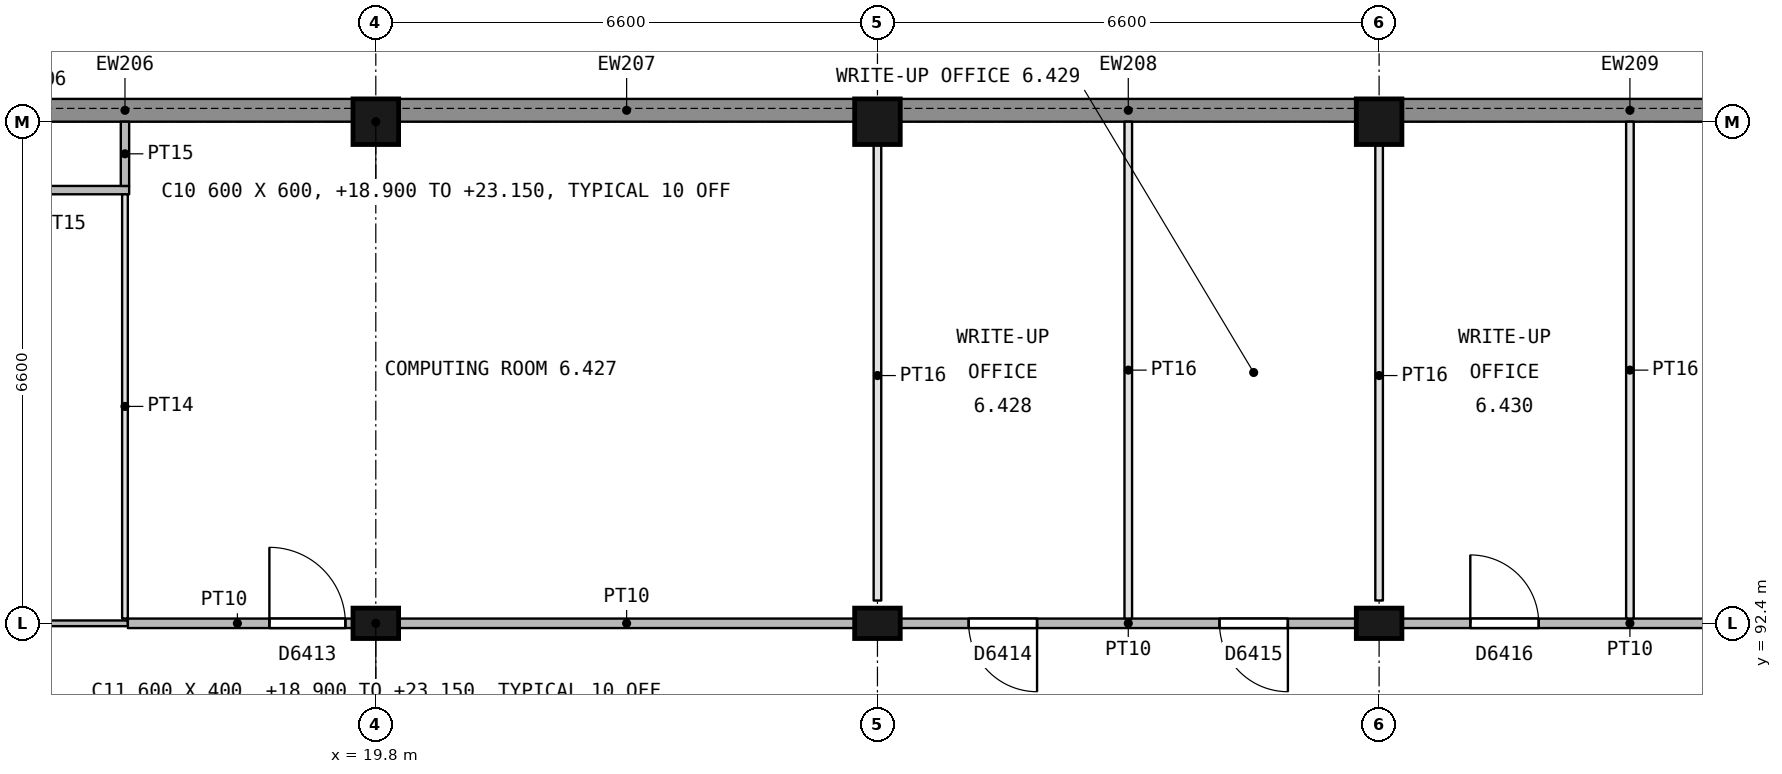
"""IFC4 building model, lengths in metres.
Left out: names, types, materials, properties, quantities, classifications, styles, units other than length and angle.
Written with IfcOpenShell. Run it as: python <this file> out.ifc"""

import sys

from ifc_helpers import new_model, si_unit, direction, frame, frame_2d, origin, origin_2d, place, context, subcontext, project, spatial, rectangle, extrude, element, fill, save


model = new_model("IFC4")
c1 = context("Model", 3, precision=1e-05, world=origin(), true_north=direction((0.0, 1.0)))
c2 = subcontext(c1, "Body", "Model", "MODEL_VIEW")
j1 = project(units=[si_unit("LENGTHUNIT", "METRE"), si_unit("PLANEANGLEUNIT", "RADIAN")], contexts=[c1])
p1 = place(None, origin())
s1 = spatial("IfcSite", under=j1, at=p1, CompositionType="ELEMENT")
p2 = place(p1, origin())
s2 = spatial("IfcBuilding", under=s1, at=p2, CompositionType="ELEMENT")
p3 = place(p2, frame((0.0, 0.0, 18.9)))
s3 = spatial("IfcBuildingStorey", under=s2, at=p3, CompositionType="ELEMENT", Elevation=18.9)
p4 = place(p3, frame((19.8, 92.4, 0.0), z_axis=(0.0, 0.0, 1.0), x_axis=(1.0, 0.0, 0.0)))
e1 = element("IfcColumn", 1, at=p4, inside=s3, PredefinedType="COLUMN", context=c2, shape_type="SweptSolid", body=[
    extrude(rectangle(XDim=0.6, YDim=0.4, at=origin_2d()), origin(), (0.0, 0.0, 1.0), 4.25),
])
p5 = place(p3, frame((19.8, 99.0, 0.0), z_axis=(0.0, 0.0, 1.0), x_axis=(1.0, 0.0, 0.0)))
e2 = element("IfcColumn", 2, at=p5, inside=s3, PredefinedType="COLUMN", context=c2, shape_type="SweptSolid", body=[
    extrude(rectangle(XDim=0.6, YDim=0.6, at=origin_2d()), origin(), (0.0, 0.0, 1.0), 4.25),
])
p6 = place(p3, frame((26.4, 92.4, 0.0), z_axis=(0.0, 0.0, 1.0), x_axis=(1.0, 0.0, 0.0)))
e3 = element("IfcColumn", 3, at=p6, inside=s3, PredefinedType="COLUMN", context=c2, shape_type="SweptSolid", body=[
    extrude(rectangle(XDim=0.6, YDim=0.4, at=origin_2d()), origin(), (0.0, 0.0, 1.0), 4.25),
])
p7 = place(p3, frame((26.4, 99.0, 0.0), z_axis=(0.0, 0.0, 1.0), x_axis=(1.0, 0.0, 0.0)))
e4 = element("IfcColumn", 4, at=p7, inside=s3, PredefinedType="COLUMN", context=c2, shape_type="SweptSolid", body=[
    extrude(rectangle(XDim=0.6, YDim=0.6, at=origin_2d()), origin(), (0.0, 0.0, 1.0), 4.25),
])
p8 = place(p3, frame((33.0, 92.4, 0.0), z_axis=(0.0, 0.0, 1.0), x_axis=(1.0, 0.0, 0.0)))
e5 = element("IfcColumn", 5, at=p8, inside=s3, PredefinedType="COLUMN", context=c2, shape_type="SweptSolid", body=[
    extrude(rectangle(XDim=0.6, YDim=0.4, at=origin_2d()), origin(), (0.0, 0.0, 1.0), 4.25),
])
p9 = place(p3, frame((33.0, 99.0, 0.0), z_axis=(0.0, 0.0, 1.0), x_axis=(1.0, 0.0, 0.0)))
e6 = element("IfcColumn", 6, at=p9, inside=s3, PredefinedType="COLUMN", context=c2, shape_type="SweptSolid", body=[
    extrude(rectangle(XDim=0.6, YDim=0.6, at=origin_2d()), origin(), (0.0, 0.0, 1.0), 4.25),
])
for number, where, z_axis, x_axis in (
    (7, (13.5, 99.15, 0.0), (0.0, 0.0, 1.0), (1.0, 0.0, 0.0)),
    (8, (20.1, 99.15, 0.0), (0.0, 0.0, 1.0), (1.0, 0.0, 0.0)),
    (9, (26.7, 99.15, 0.0), (0.0, 0.0, 1.0), (1.0, 0.0, 0.0)),
    (10, (33.3, 99.15, 0.0), (0.0, 0.0, 1.0), (1.0, 0.0, 0.0)),
):
    element("IfcWall", number, at=place(p3, frame(where, z_axis=z_axis, x_axis=x_axis)), inside=s3, PredefinedType="STANDARD", context=c2, shape_type="SweptSolid", body=[
        extrude(rectangle(XDim=6.0, YDim=0.3, at=frame_2d((3.0, 0.0))), origin(), (0.0, 0.0, 1.0), 3.65),
    ])
p10 = place(p3, frame((13.5, 92.4, 0.0), z_axis=(0.0, 0.0, 1.0), x_axis=(1.0, 0.0, 0.0)))
e11 = element("IfcWall", 11, at=p10, inside=s3, PredefinedType="PARTITIONING", context=c2, shape_type="SweptSolid", body=[
    extrude(rectangle(XDim=3.038, YDim=0.075, at=frame_2d((1.519, 0.0))), origin(), (0.0, 0.0, 1.0), 3.65),
])
p11 = place(p3, frame((16.538, 92.4, 0.0), z_axis=(0.0, 0.0, 1.0), x_axis=(1.0, 0.0, 0.0)))
e12 = element("IfcWall", 12, at=p11, inside=s3, PredefinedType="PARTITIONING", context=c2, shape_type="SweptSolid", body=[
    extrude(rectangle(XDim=2.962, YDim=0.125, at=frame_2d((1.481, 0.0))), origin(), (0.0, 0.0, 1.0), 3.65),
])
p12 = place(p11, frame((1.862, 0.0, 0.0)))
e13 = element("IfcOpeningElement", 13, at=p12, cuts=e12, PredefinedType="OPENING", context=c2, shape_type="SweptSolid", body=[
    extrude(rectangle(XDim=1.0, YDim=2.1, at=frame_2d((0.5, 1.05))), frame((0.0, 0.073, 0.0), z_axis=(0.0, -1.0, 0.0), x_axis=(1.0, 0.0, 0.0)), (0.0, 0.0, 1.0), 0.145),
])
p13 = place(p3, frame((20.1, 92.4, 0.0), z_axis=(0.0, 0.0, 1.0), x_axis=(1.0, 0.0, 0.0)))
e14 = element("IfcWall", 14, at=p13, inside=s3, PredefinedType="PARTITIONING", context=c2, shape_type="SweptSolid", body=[
    extrude(rectangle(XDim=6.0, YDim=0.125, at=frame_2d((3.0, 0.0))), origin(), (0.0, 0.0, 1.0), 3.65),
])
p14 = place(p3, frame((26.7, 92.4, 0.0), z_axis=(0.0, 0.0, 1.0), x_axis=(1.0, 0.0, 0.0)))
e15 = element("IfcWall", 15, at=p14, inside=s3, PredefinedType="PARTITIONING", context=c2, shape_type="SweptSolid", body=[
    extrude(rectangle(XDim=6.0, YDim=0.125, at=frame_2d((3.0, 0.0))), origin(), (0.0, 0.0, 1.0), 3.65),
])
p15 = place(p14, frame((0.9, 0.0, 0.0)))
e16 = element("IfcOpeningElement", 16, at=p15, cuts=e15, PredefinedType="OPENING", context=c2, shape_type="SweptSolid", body=[
    extrude(rectangle(XDim=0.9, YDim=2.1, at=frame_2d((0.45, 1.05))), frame((0.0, 0.073, 0.0), z_axis=(0.0, -1.0, 0.0), x_axis=(1.0, 0.0, 0.0)), (0.0, 0.0, 1.0), 0.145),
])
p16 = place(p14, frame((4.2, 0.0, 0.0)))
e17 = element("IfcOpeningElement", 17, at=p16, cuts=e15, PredefinedType="OPENING", context=c2, shape_type="SweptSolid", body=[
    extrude(rectangle(XDim=0.9, YDim=2.1, at=frame_2d((0.45, 1.05))), frame((0.0, 0.073, 0.0), z_axis=(0.0, -1.0, 0.0), x_axis=(1.0, 0.0, 0.0)), (0.0, 0.0, 1.0), 0.145),
])
p17 = place(p3, frame((33.3, 92.4, 0.0), z_axis=(0.0, 0.0, 1.0), x_axis=(1.0, 0.0, 0.0)))
e18 = element("IfcWall", 18, at=p17, inside=s3, PredefinedType="PARTITIONING", context=c2, shape_type="SweptSolid", body=[
    extrude(rectangle(XDim=6.0, YDim=0.125, at=frame_2d((3.0, 0.0))), origin(), (0.0, 0.0, 1.0), 3.65),
])
p18 = place(p17, frame((0.9, 0.0, 0.0)))
e19 = element("IfcOpeningElement", 19, at=p18, cuts=e18, PredefinedType="OPENING", context=c2, shape_type="SweptSolid", body=[
    extrude(rectangle(XDim=0.9, YDim=2.1, at=frame_2d((0.45, 1.05))), frame((0.0, 0.073, 0.0), z_axis=(0.0, -1.0, 0.0), x_axis=(1.0, 0.0, 0.0)), (0.0, 0.0, 1.0), 0.145),
])
p19 = place(p17, frame((4.2, 0.0, 0.0)))
e20 = element("IfcOpeningElement", 20, at=p19, cuts=e18, PredefinedType="OPENING", context=c2, shape_type="SweptSolid", body=[
    extrude(rectangle(XDim=0.9, YDim=2.1, at=frame_2d((0.45, 1.05))), frame((0.0, 0.073, 0.0), z_axis=(0.0, -1.0, 0.0), x_axis=(1.0, 0.0, 0.0)), (0.0, 0.0, 1.0), 0.145),
])
p20 = place(p3, frame((16.555, 98.1, 0.0), z_axis=(0.0, 0.0, 1.0), x_axis=(-1.0, 0.0, 0.0)))
e21 = element("IfcWall", 21, at=p20, inside=s3, PredefinedType="PARTITIONING", context=c2, shape_type="SweptSolid", body=[
    extrude(rectangle(XDim=3.3, YDim=0.11, at=frame_2d((1.65, 0.0))), origin(), (0.0, 0.0, 1.0), 3.65),
])
p21 = place(p20, frame((1.405, 0.0, 0.0)))
e22 = element("IfcOpeningElement", 22, at=p21, cuts=e21, PredefinedType="OPENING", context=c2, shape_type="SweptSolid", body=[
    extrude(rectangle(XDim=0.6, YDim=2.1, at=frame_2d((0.3, 1.05))), frame((0.0, 0.065, 0.0), z_axis=(0.0, -1.0, 0.0), x_axis=(1.0, 0.0, 0.0)), (0.0, 0.0, 1.0), 0.13),
])
p22 = place(p3, frame((16.5, 92.463, 0.0), z_axis=(0.0, 0.0, 1.0), x_axis=(0.0, 1.0, 0.0)))
e23 = element("IfcWall", 23, at=p22, inside=s3, PredefinedType="PARTITIONING", context=c2, shape_type="SweptSolid", body=[
    extrude(rectangle(XDim=5.582, YDim=0.075, at=frame_2d((2.791, 0.0))), origin(), (0.0, 0.0, 1.0), 3.65),
])
p23 = place(p3, frame((16.5, 98.155, 0.0), z_axis=(0.0, 0.0, 1.0), x_axis=(0.0, 1.0, 0.0)))
e24 = element("IfcWall", 24, at=p23, inside=s3, PredefinedType="PARTITIONING", context=c2, shape_type="SweptSolid", body=[
    extrude(rectangle(XDim=0.845, YDim=0.11, at=frame_2d((0.422, 0.0))), origin(), (0.0, 0.0, 1.0), 3.65),
])
p24 = place(p3, frame((26.4, 92.7, 0.0), z_axis=(0.0, 0.0, 1.0), x_axis=(0.0, 1.0, 0.0)))
e25 = element("IfcWall", 25, at=p24, inside=s3, PredefinedType="PARTITIONING", context=c2, shape_type="SweptSolid", body=[
    extrude(rectangle(XDim=6.0, YDim=0.1, at=frame_2d((3.0, 0.0))), origin(), (0.0, 0.0, 1.0), 3.65),
])
p25 = place(p3, frame((29.7, 92.463, 0.0), z_axis=(0.0, 0.0, 1.0), x_axis=(0.0, 1.0, 0.0)))
e26 = element("IfcWall", 26, at=p25, inside=s3, PredefinedType="PARTITIONING", context=c2, shape_type="SweptSolid", body=[
    extrude(rectangle(XDim=6.537, YDim=0.1, at=frame_2d((3.269, 0.0))), origin(), (0.0, 0.0, 1.0), 3.65),
])
p26 = place(p3, frame((33.0, 92.7, 0.0), z_axis=(0.0, 0.0, 1.0), x_axis=(0.0, 1.0, 0.0)))
e27 = element("IfcWall", 27, at=p26, inside=s3, PredefinedType="PARTITIONING", context=c2, shape_type="SweptSolid", body=[
    extrude(rectangle(XDim=6.0, YDim=0.1, at=frame_2d((3.0, 0.0))), origin(), (0.0, 0.0, 1.0), 3.65),
])
p27 = place(p3, frame((36.3, 92.463, 0.0), z_axis=(0.0, 0.0, 1.0), x_axis=(0.0, 1.0, 0.0)))
e28 = element("IfcWall", 28, at=p27, inside=s3, PredefinedType="PARTITIONING", context=c2, shape_type="SweptSolid", body=[
    extrude(rectangle(XDim=6.537, YDim=0.1, at=frame_2d((3.269, 0.0))), origin(), (0.0, 0.0, 1.0), 3.65),
])
p28 = place(p12, origin())
e29 = element("IfcDoor", 29, at=p28, inside=s3, OperationType="SINGLE_SWING_LEFT", PredefinedType="DOOR", context=c2, shape_type="SweptSolid", body=[
    extrude(rectangle(XDim=1.0, YDim=2.1, at=frame_2d((0.5, 1.05))), frame((0.0, 0.025, 0.0), z_axis=(0.0, -1.0, 0.0), x_axis=(1.0, 0.0, 0.0)), (0.0, 0.0, 1.0), 0.05),
])
fill(e13, e29)
p29 = place(p15, origin())
e30 = element("IfcDoor", 30, at=p29, inside=s3, OperationType="SINGLE_SWING_RIGHT", PredefinedType="DOOR", context=c2, shape_type="SweptSolid", body=[
    extrude(rectangle(XDim=0.9, YDim=2.1, at=frame_2d((0.45, 1.05))), frame((0.0, 0.025, 0.0), z_axis=(0.0, -1.0, 0.0), x_axis=(1.0, 0.0, 0.0)), (0.0, 0.0, 1.0), 0.05),
])
fill(e16, e30)
p30 = place(p16, origin())
e31 = element("IfcDoor", 31, at=p30, inside=s3, OperationType="SINGLE_SWING_RIGHT", PredefinedType="DOOR", context=c2, shape_type="SweptSolid", body=[
    extrude(rectangle(XDim=0.9, YDim=2.1, at=frame_2d((0.45, 1.05))), frame((0.0, 0.025, 0.0), z_axis=(0.0, -1.0, 0.0), x_axis=(1.0, 0.0, 0.0)), (0.0, 0.0, 1.0), 0.05),
])
fill(e17, e31)
p31 = place(p18, origin())
e32 = element("IfcDoor", 32, at=p31, inside=s3, OperationType="SINGLE_SWING_LEFT", PredefinedType="DOOR", context=c2, shape_type="SweptSolid", body=[
    extrude(rectangle(XDim=0.9, YDim=2.1, at=frame_2d((0.45, 1.05))), frame((0.0, 0.025, 0.0), z_axis=(0.0, -1.0, 0.0), x_axis=(1.0, 0.0, 0.0)), (0.0, 0.0, 1.0), 0.05),
])
fill(e19, e32)
save(model, sys.argv[1])
